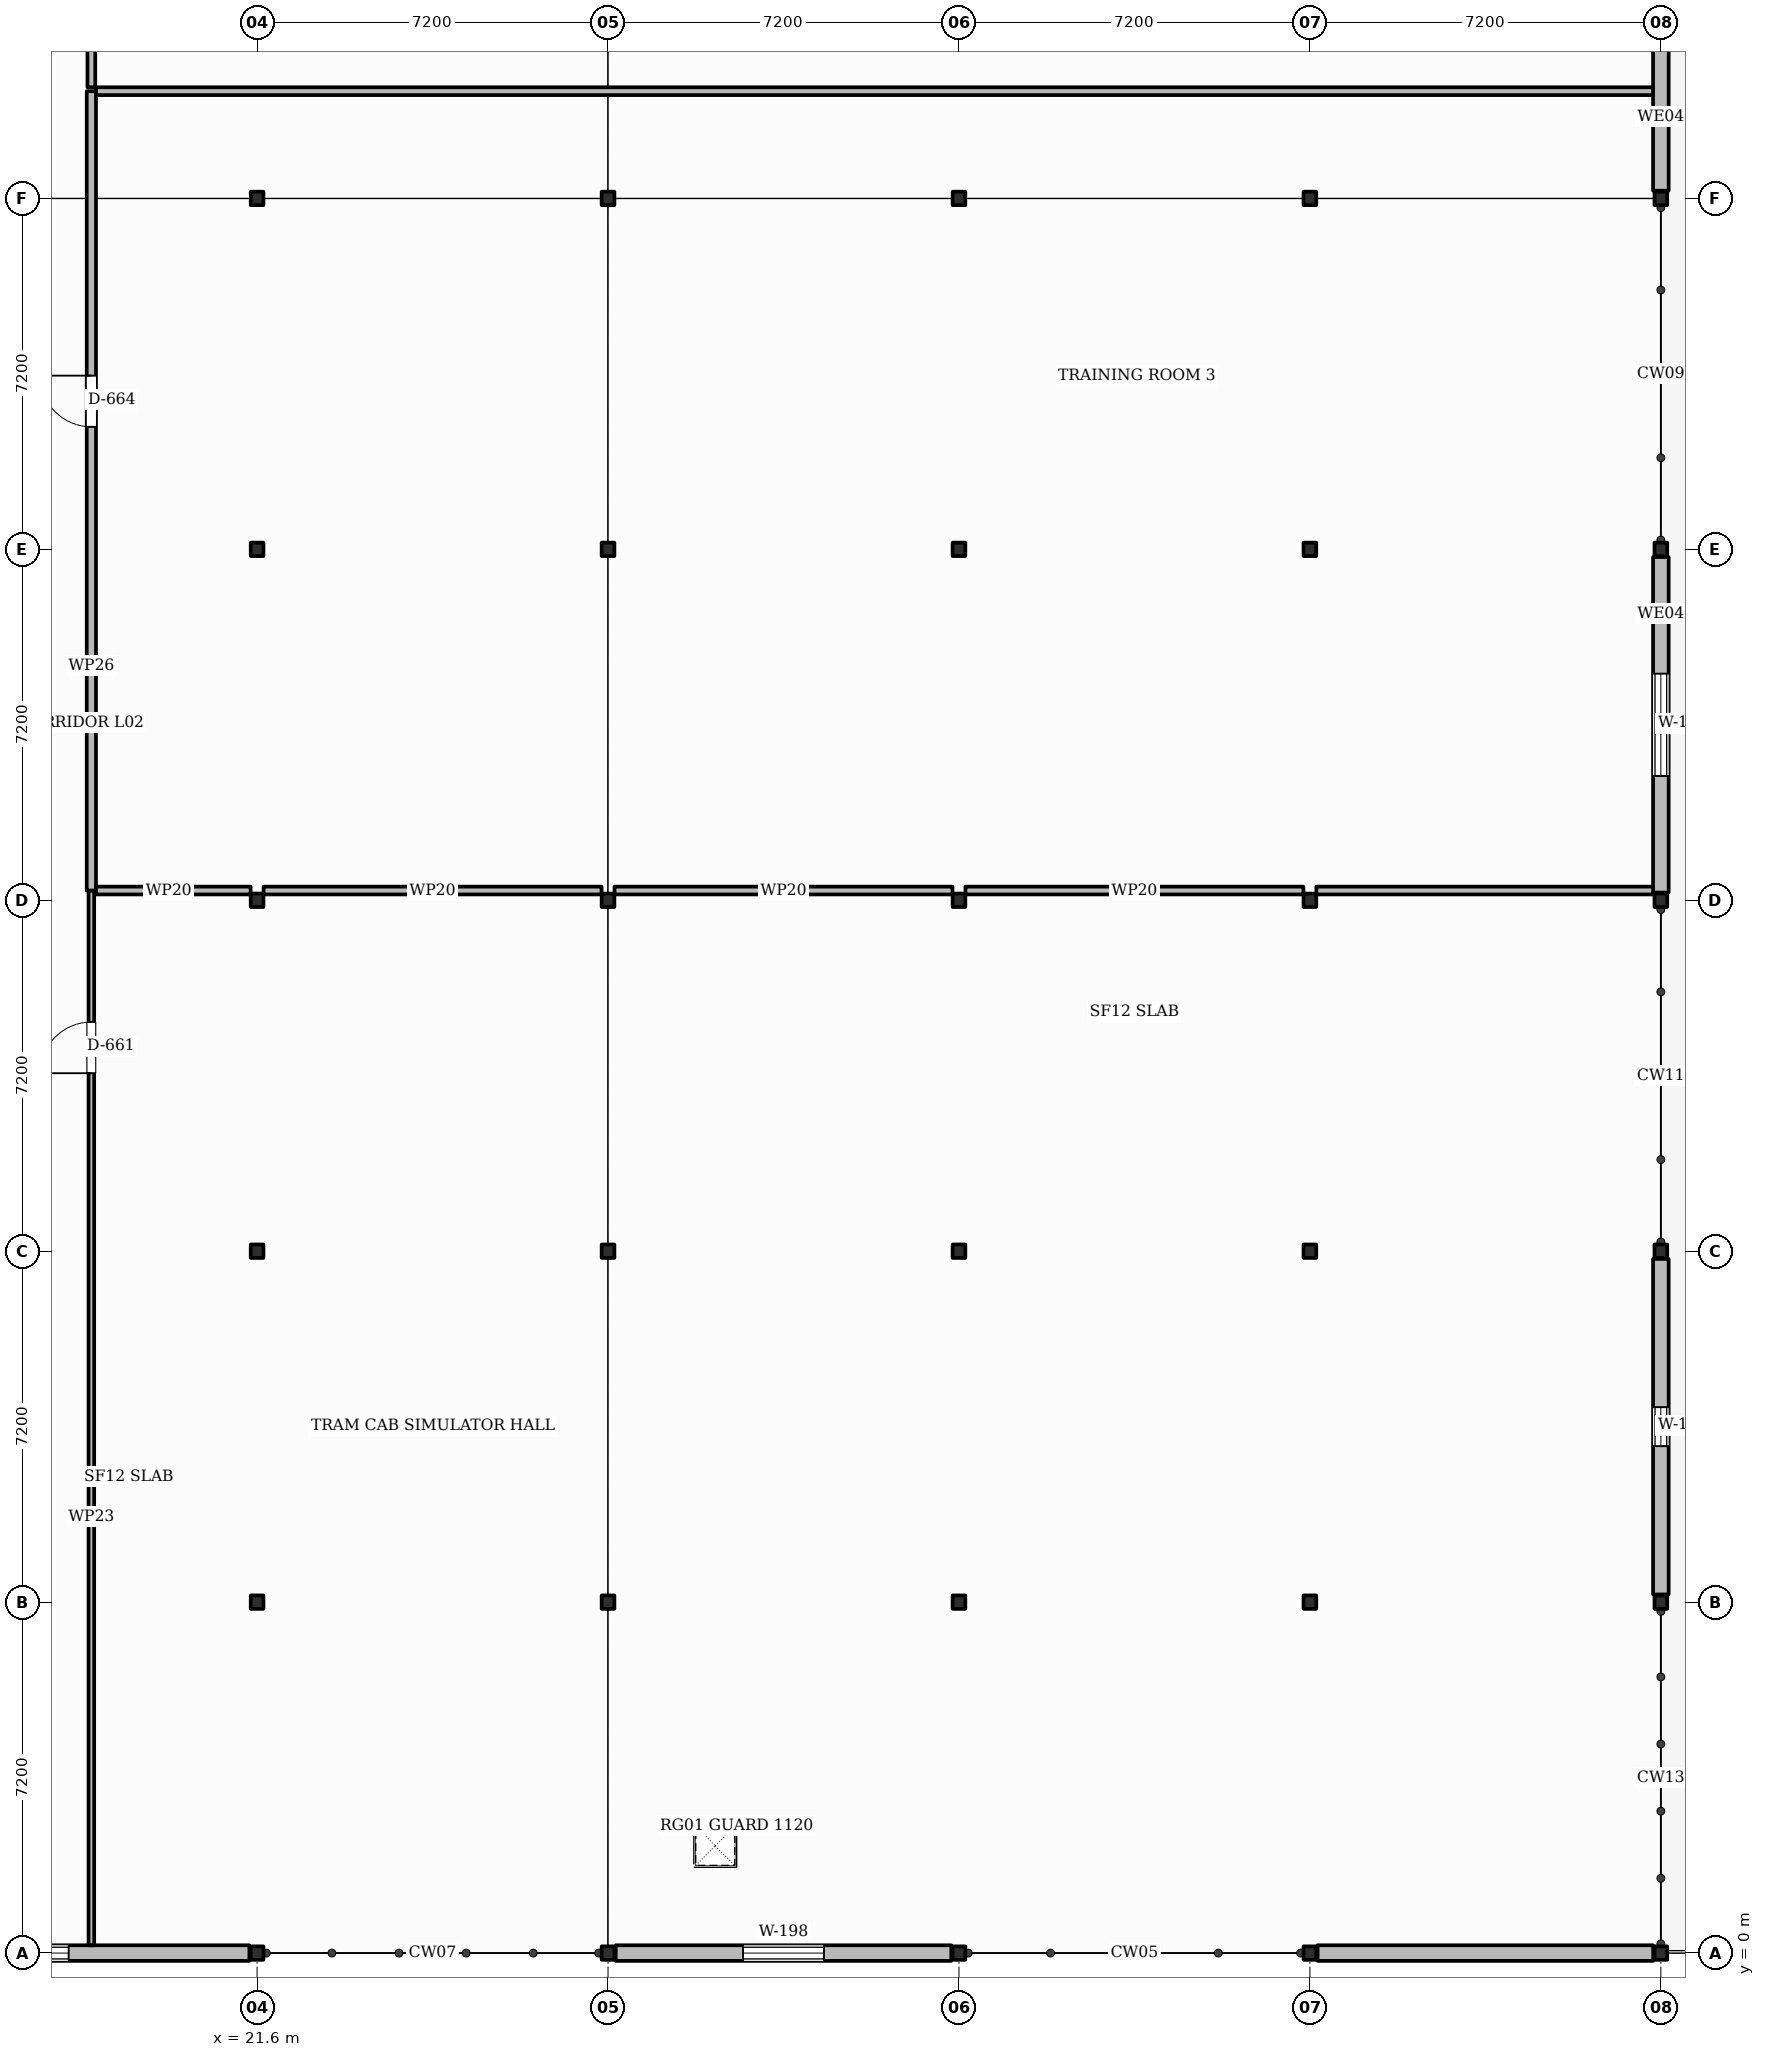
"""IFC4 building model, lengths in metres.
Left out: names, types, materials, properties, quantities, classifications, styles, units other than length and angle.
Written with IfcOpenShell. Run it as: python <this file> out.ifc"""

import sys

from ifc_helpers import new_model, si_unit, direction, frame, frame_2d, origin, origin_2d, place, context, subcontext, project, spatial, rectangle, i_section, extrude, element, fill, save


model = new_model("IFC4")
c1 = context("Model", 3, precision=1e-05, world=origin(), true_north=direction((0.0, 1.0)))
c2 = subcontext(c1, "Body", "Model", "MODEL_VIEW")
j1 = project(units=[si_unit("LENGTHUNIT", "METRE"), si_unit("PLANEANGLEUNIT", "RADIAN")], contexts=[c1])
p1 = place(None, origin())
s1 = spatial("IfcSite", under=j1, at=p1, CompositionType="ELEMENT")
p2 = place(p1, origin())
s2 = spatial("IfcBuilding", under=s1, at=p2, CompositionType="ELEMENT")
p3 = place(p2, frame((0.0, 0.0, 9.9)))
s3 = spatial("IfcBuildingStorey", under=s2, at=p3, CompositionType="ELEMENT", Elevation=9.9)
for number, where, z_axis, x_axis in (
    (1, (21.6, 0.0, 0.0), (0.0, 0.0, 1.0), (1.0, 0.0, 0.0)),
    (2, (21.6, 7.2, 0.0), (0.0, 0.0, 1.0), (1.0, 0.0, 0.0)),
    (3, (21.6, 14.4, 0.0), (0.0, 0.0, 1.0), (1.0, 0.0, 0.0)),
    (4, (21.6, 21.6, 0.0), (0.0, 0.0, 1.0), (1.0, 0.0, 0.0)),
    (5, (21.6, 28.8, 0.0), (0.0, 0.0, 1.0), (1.0, 0.0, 0.0)),
    (6, (21.6, 36.0, 0.0), (0.0, 0.0, 1.0), (1.0, 0.0, 0.0)),
    (7, (28.8, 0.0, 0.0), (0.0, 0.0, 1.0), (1.0, 0.0, 0.0)),
    (8, (28.8, 7.2, 0.0), (0.0, 0.0, 1.0), (1.0, 0.0, 0.0)),
    (9, (28.8, 14.4, 0.0), (0.0, 0.0, 1.0), (1.0, 0.0, 0.0)),
    (10, (28.8, 21.6, 0.0), (0.0, 0.0, 1.0), (1.0, 0.0, 0.0)),
    (11, (28.8, 28.8, 0.0), (0.0, 0.0, 1.0), (1.0, 0.0, 0.0)),
    (12, (28.8, 36.0, 0.0), (0.0, 0.0, 1.0), (1.0, 0.0, 0.0)),
    (13, (36.0, 0.0, 0.0), (0.0, 0.0, 1.0), (1.0, 0.0, 0.0)),
    (14, (36.0, 7.2, 0.0), (0.0, 0.0, 1.0), (1.0, 0.0, 0.0)),
    (15, (36.0, 14.4, 0.0), (0.0, 0.0, 1.0), (1.0, 0.0, 0.0)),
    (16, (36.0, 21.6, 0.0), (0.0, 0.0, 1.0), (1.0, 0.0, 0.0)),
    (17, (36.0, 28.8, 0.0), (0.0, 0.0, 1.0), (1.0, 0.0, 0.0)),
    (18, (36.0, 36.0, 0.0), (0.0, 0.0, 1.0), (1.0, 0.0, 0.0)),
    (19, (43.2, 0.0, 0.0), (0.0, 0.0, 1.0), (1.0, 0.0, 0.0)),
    (20, (43.2, 7.2, 0.0), (0.0, 0.0, 1.0), (1.0, 0.0, 0.0)),
    (21, (43.2, 14.4, 0.0), (0.0, 0.0, 1.0), (1.0, 0.0, 0.0)),
    (22, (43.2, 21.6, 0.0), (0.0, 0.0, 1.0), (1.0, 0.0, 0.0)),
    (23, (43.2, 28.8, 0.0), (0.0, 0.0, 1.0), (1.0, 0.0, 0.0)),
    (24, (43.2, 36.0, 0.0), (0.0, 0.0, 1.0), (1.0, 0.0, 0.0)),
    (25, (50.4, 0.0, 0.0), (0.0, 0.0, 1.0), (1.0, 0.0, 0.0)),
    (26, (50.4, 7.2, 0.0), (0.0, 0.0, 1.0), (1.0, 0.0, 0.0)),
    (27, (50.4, 14.4, 0.0), (0.0, 0.0, 1.0), (1.0, 0.0, 0.0)),
    (28, (50.4, 21.6, 0.0), (0.0, 0.0, 1.0), (1.0, 0.0, 0.0)),
    (29, (50.4, 28.8, 0.0), (0.0, 0.0, 1.0), (1.0, 0.0, 0.0)),
    (30, (50.4, 36.0, 0.0), (0.0, 0.0, 1.0), (1.0, 0.0, 0.0)),
):
    element("IfcColumn", number, at=place(p3, frame(where, z_axis=z_axis, x_axis=x_axis)), inside=s3, PredefinedType="COLUMN", context=c2, shape_type="SweptSolid", body=[
        extrude(i_section(OverallWidth=0.261, OverallDepth=0.276, WebThickness=0.015, FlangeThickness=0.025, FilletRadius=0.013, at=origin_2d()), origin(), (0.0, 0.0, 1.0), 4.5),
    ])
p4 = place(p3, frame((50.4, 43.042, 0.0), z_axis=(0.0, 0.0, 1.0), x_axis=(0.0, -1.0, 0.0)))
e31 = element("IfcWall", 31, at=p4, inside=s3, PredefinedType="SOLIDWALL", context=c2, shape_type="SweptSolid", body=[
    extrude(rectangle(XDim=6.884, YDim=0.32, at=frame_2d((3.442, 0.0))), origin(), (0.0, 0.0, 1.0), 3.8),
])
p5 = place(p4, frame((1.216, 0.0, 1.05)))
e32 = element("IfcOpeningElement", 32, at=p5, cuts=e31, PredefinedType="OPENING", context=c2, shape_type="SweptSolid", body=[
    extrude(rectangle(XDim=2.56, YDim=1.55, at=frame_2d((1.28, 0.775))), frame((0.0, 0.17, 0.0), z_axis=(0.0, -1.0, 0.0), x_axis=(1.0, 0.0, 0.0)), (0.0, 0.0, 1.0), 0.34),
])
p6 = place(p3, frame((50.4, 28.642, 0.0), z_axis=(0.0, 0.0, 1.0), x_axis=(0.0, -1.0, 0.0)))
e33 = element("IfcWall", 33, at=p6, inside=s3, PredefinedType="SOLIDWALL", context=c2, shape_type="SweptSolid", body=[
    extrude(rectangle(XDim=6.884, YDim=0.32, at=frame_2d((3.442, 0.0))), origin(), (0.0, 0.0, 1.0), 3.8),
])
p7 = place(p6, frame((2.392, 0.0, 1.05)))
e34 = element("IfcOpeningElement", 34, at=p7, cuts=e33, PredefinedType="OPENING", context=c2, shape_type="SweptSolid", body=[
    extrude(rectangle(XDim=2.1, YDim=1.8, at=frame_2d((1.05, 0.9))), frame((0.0, 0.17, 0.0), z_axis=(0.0, -1.0, 0.0), x_axis=(1.0, 0.0, 0.0)), (0.0, 0.0, 1.0), 0.34),
])
p8 = place(p3, frame((50.4, 14.242, 0.0), z_axis=(0.0, 0.0, 1.0), x_axis=(0.0, -1.0, 0.0)))
e35 = element("IfcWall", 35, at=p8, inside=s3, PredefinedType="SOLIDWALL", context=c2, shape_type="SweptSolid", body=[
    extrude(rectangle(XDim=6.884, YDim=0.32, at=frame_2d((3.442, 0.0))), origin(), (0.0, 0.0, 1.0), 3.8),
])
p9 = place(p8, frame((3.042, 0.0, 1.05)))
e36 = element("IfcOpeningElement", 36, at=p9, cuts=e35, PredefinedType="OPENING", context=c2, shape_type="SweptSolid", body=[
    extrude(rectangle(XDim=0.8, YDim=1.4, at=frame_2d((0.4, 0.7))), frame((0.0, 0.17, 0.0), z_axis=(0.0, -1.0, 0.0), x_axis=(1.0, 0.0, 0.0)), (0.0, 0.0, 1.0), 0.34),
])
p10 = place(p3, frame((50.242, 0.0, 0.0), z_axis=(0.0, 0.0, 1.0), x_axis=(-1.0, 0.0, 0.0)))
e37 = element("IfcWall", 37, at=p10, inside=s3, PredefinedType="SOLIDWALL", context=c2, shape_type="SweptSolid", body=[
    extrude(rectangle(XDim=6.884, YDim=0.32, at=frame_2d((3.442, 0.0))), origin(), (0.0, 0.0, 1.0), 3.8),
])
p11 = place(p3, frame((35.842, 0.0, 0.0), z_axis=(0.0, 0.0, 1.0), x_axis=(-1.0, 0.0, 0.0)))
e38 = element("IfcWall", 38, at=p11, inside=s3, PredefinedType="SOLIDWALL", context=c2, shape_type="SweptSolid", body=[
    extrude(rectangle(XDim=6.884, YDim=0.32, at=frame_2d((3.442, 0.0))), origin(), (0.0, 0.0, 1.0), 3.8),
])
p12 = place(p11, frame((2.612, 0.0, 1.05)))
e39 = element("IfcOpeningElement", 39, at=p12, cuts=e38, PredefinedType="OPENING", context=c2, shape_type="SweptSolid", body=[
    extrude(rectangle(XDim=1.66, YDim=1.8, at=frame_2d((0.83, 0.9))), frame((0.0, 0.17, 0.0), z_axis=(0.0, -1.0, 0.0), x_axis=(1.0, 0.0, 0.0)), (0.0, 0.0, 1.0), 0.34),
])
p13 = place(p3, frame((21.442, 0.0, 0.0), z_axis=(0.0, 0.0, 1.0), x_axis=(-1.0, 0.0, 0.0)))
e40 = element("IfcWall", 40, at=p13, inside=s3, PredefinedType="SOLIDWALL", context=c2, shape_type="SweptSolid", body=[
    extrude(rectangle(XDim=6.884, YDim=0.32, at=frame_2d((3.442, 0.0))), origin(), (0.0, 0.0, 1.0), 3.8),
])
p14 = place(p13, frame((3.708, 0.0, 1.05)))
e41 = element("IfcOpeningElement", 41, at=p14, cuts=e40, PredefinedType="OPENING", context=c2, shape_type="SweptSolid", body=[
    extrude(rectangle(XDim=2.56, YDim=1.55, at=frame_2d((1.28, 0.775))), frame((0.0, 0.17, 0.0), z_axis=(0.0, -1.0, 0.0), x_axis=(1.0, 0.0, 0.0)), (0.0, 0.0, 1.0), 0.34),
])
p15 = place(p3, frame((18.2, 0.16, 0.0), z_axis=(0.0, 0.0, 1.0), x_axis=(0.0, 1.0, 0.0)))
e42 = element("IfcWall", 42, at=p15, inside=s3, PredefinedType="PARTITIONING", context=c2, shape_type="SweptSolid", body=[
    extrude(rectangle(XDim=21.64, YDim=0.115, at=frame_2d((10.82, 0.0))), origin(), (0.0, 0.0, 1.0), 3.55),
])
p16 = place(p15, frame((17.892, 0.0, 0.0)))
e43 = element("IfcOpeningElement", 43, at=p16, cuts=e42, PredefinedType="OPENING", context=c2, shape_type="SweptSolid", body=[
    extrude(rectangle(XDim=1.05, YDim=2.15, at=frame_2d((0.525, 1.075))), frame((0.0, 0.067, 0.0), z_axis=(0.0, -1.0, 0.0), x_axis=(1.0, 0.0, 0.0)), (0.0, 0.0, 1.0), 0.135),
])
p17 = place(p3, frame((18.2, 21.8, 0.0), z_axis=(0.0, 0.0, 1.0), x_axis=(0.0, 1.0, 0.0)))
e44 = element("IfcWall", 44, at=p17, inside=s3, PredefinedType="PARTITIONING", context=c2, shape_type="SweptSolid", body=[
    extrude(rectangle(XDim=16.4, YDim=0.19, at=frame_2d((8.2, 0.0))), origin(), (0.0, 0.0, 1.0), 3.55),
])
p18 = place(p17, frame((9.514, 0.0, 0.0)))
e45 = element("IfcOpeningElement", 45, at=p18, cuts=e44, PredefinedType="OPENING", context=c2, shape_type="SweptSolid", body=[
    extrude(rectangle(XDim=1.05, YDim=2.15, at=frame_2d((0.525, 1.075))), frame((0.0, 0.105, 0.0), z_axis=(0.0, -1.0, 0.0), x_axis=(1.0, 0.0, 0.0)), (0.0, 0.0, 1.0), 0.21),
])
p19 = place(p3, frame((18.295, 21.8, 0.0), z_axis=(0.0, 0.0, 1.0), x_axis=(1.0, 0.0, 0.0)))
e46 = element("IfcWall", 46, at=p19, inside=s3, PredefinedType="PARTITIONING", context=c2, shape_type="SweptSolid", body=[
    extrude(rectangle(XDim=3.172, YDim=0.16, at=frame_2d((1.586, 0.0))), origin(), (0.0, 0.0, 1.0), 3.55),
])
p20 = place(p3, frame((21.733, 21.8, 0.0), z_axis=(0.0, 0.0, 1.0), x_axis=(1.0, 0.0, 0.0)))
e47 = element("IfcWall", 47, at=p20, inside=s3, PredefinedType="PARTITIONING", context=c2, shape_type="SweptSolid", body=[
    extrude(rectangle(XDim=6.934, YDim=0.16, at=frame_2d((3.467, 0.0))), origin(), (0.0, 0.0, 1.0), 3.55),
])
for number, where, z_axis, x_axis in (
    (48, (28.933, 21.8, 0.0), (0.0, 0.0, 1.0), (1.0, 0.0, 0.0)),
    (49, (36.133, 21.8, 0.0), (0.0, 0.0, 1.0), (1.0, 0.0, 0.0)),
):
    element("IfcWall", number, at=place(p3, frame(where, z_axis=z_axis, x_axis=x_axis)), inside=s3, PredefinedType="PARTITIONING", context=c2, shape_type="SweptSolid", body=[
        extrude(rectangle(XDim=6.934, YDim=0.16, at=frame_2d((3.467, 0.0))), origin(), (0.0, 0.0, 1.0), 3.55),
    ])
p21 = place(p3, frame((43.333, 21.8, 0.0), z_axis=(0.0, 0.0, 1.0), x_axis=(1.0, 0.0, 0.0)))
e50 = element("IfcWall", 50, at=p21, inside=s3, PredefinedType="PARTITIONING", context=c2, shape_type="SweptSolid", body=[
    extrude(rectangle(XDim=6.907, YDim=0.16, at=frame_2d((3.454, 0.0))), origin(), (0.0, 0.0, 1.0), 3.55),
])
p22 = place(p3, frame((18.295, 38.2, 0.0), z_axis=(0.0, 0.0, 1.0), x_axis=(1.0, 0.0, 0.0)))
e51 = element("IfcWall", 51, at=p22, inside=s3, PredefinedType="PARTITIONING", context=c2, shape_type="SweptSolid", body=[
    extrude(rectangle(XDim=31.945, YDim=0.16, at=frame_2d((15.973, 0.0))), origin(), (0.0, 0.0, 1.0), 3.55),
])
p23 = place(p3, frame((18.2, 38.28, 0.0), z_axis=(0.0, 0.0, 1.0), x_axis=(0.0, 1.0, 0.0)))
e52 = element("IfcWall", 52, at=p23, inside=s3, PredefinedType="PARTITIONING", context=c2, shape_type="SweptSolid", body=[
    extrude(rectangle(XDim=16.055, YDim=0.16, at=frame_2d((8.027, 0.0))), origin(), (0.0, 0.0, 1.0), 3.55),
])
p24 = place(p7, origin())
e53 = element("IfcWindow", 53, at=p24, inside=s3, PartitioningType="SINGLE_PANEL", PredefinedType="WINDOW", context=c2, shape_type="SweptSolid", body=[
    extrude(rectangle(XDim=2.1, YDim=1.8, at=frame_2d((1.05, 0.9))), frame((0.0, 0.03, 0.0), z_axis=(0.0, -1.0, 0.0), x_axis=(1.0, 0.0, 0.0)), (0.0, 0.0, 1.0), 0.06),
])
fill(e34, e53)
p25 = place(p9, origin())
e54 = element("IfcWindow", 54, at=p25, inside=s3, PartitioningType="SINGLE_PANEL", PredefinedType="WINDOW", context=c2, shape_type="SweptSolid", body=[
    extrude(rectangle(XDim=0.8, YDim=1.4, at=frame_2d((0.4, 0.7))), frame((0.0, 0.03, 0.0), z_axis=(0.0, -1.0, 0.0), x_axis=(1.0, 0.0, 0.0)), (0.0, 0.0, 1.0), 0.06),
])
fill(e36, e54)
p26 = place(p12, origin())
e55 = element("IfcWindow", 55, at=p26, inside=s3, PartitioningType="SINGLE_PANEL", PredefinedType="WINDOW", context=c2, shape_type="SweptSolid", body=[
    extrude(rectangle(XDim=1.66, YDim=1.8, at=frame_2d((0.83, 0.9))), frame((0.0, 0.03, 0.0), z_axis=(0.0, -1.0, 0.0), x_axis=(1.0, 0.0, 0.0)), (0.0, 0.0, 1.0), 0.06),
])
fill(e39, e55)
p27 = place(p14, origin())
e56 = element("IfcWindow", 56, at=p27, inside=s3, PartitioningType="SINGLE_PANEL", PredefinedType="WINDOW", context=c2, shape_type="SweptSolid", body=[
    extrude(rectangle(XDim=2.56, YDim=1.55, at=frame_2d((1.28, 0.775))), frame((0.0, 0.03, 0.0), z_axis=(0.0, -1.0, 0.0), x_axis=(1.0, 0.0, 0.0)), (0.0, 0.0, 1.0), 0.06),
])
fill(e41, e56)
p28 = place(p16, origin())
e57 = element("IfcDoor", 57, at=p28, inside=s3, OperationType="SINGLE_SWING_LEFT", PredefinedType="DOOR", context=c2, shape_type="SweptSolid", body=[
    extrude(rectangle(XDim=1.05, YDim=2.15, at=frame_2d((0.525, 1.075))), frame((0.0, 0.025, 0.0), z_axis=(0.0, -1.0, 0.0), x_axis=(1.0, 0.0, 0.0)), (0.0, 0.0, 1.0), 0.05),
])
fill(e43, e57)
p29 = place(p18, origin())
e58 = element("IfcDoor", 58, at=p29, inside=s3, OperationType="SINGLE_SWING_RIGHT", PredefinedType="DOOR", context=c2, shape_type="SweptSolid", body=[
    extrude(rectangle(XDim=1.05, YDim=2.15, at=frame_2d((0.525, 1.075))), frame((0.0, 0.025, 0.0), z_axis=(0.0, -1.0, 0.0), x_axis=(1.0, 0.0, 0.0)), (0.0, 0.0, 1.0), 0.05),
])
fill(e45, e58)
save(model, sys.argv[1])
